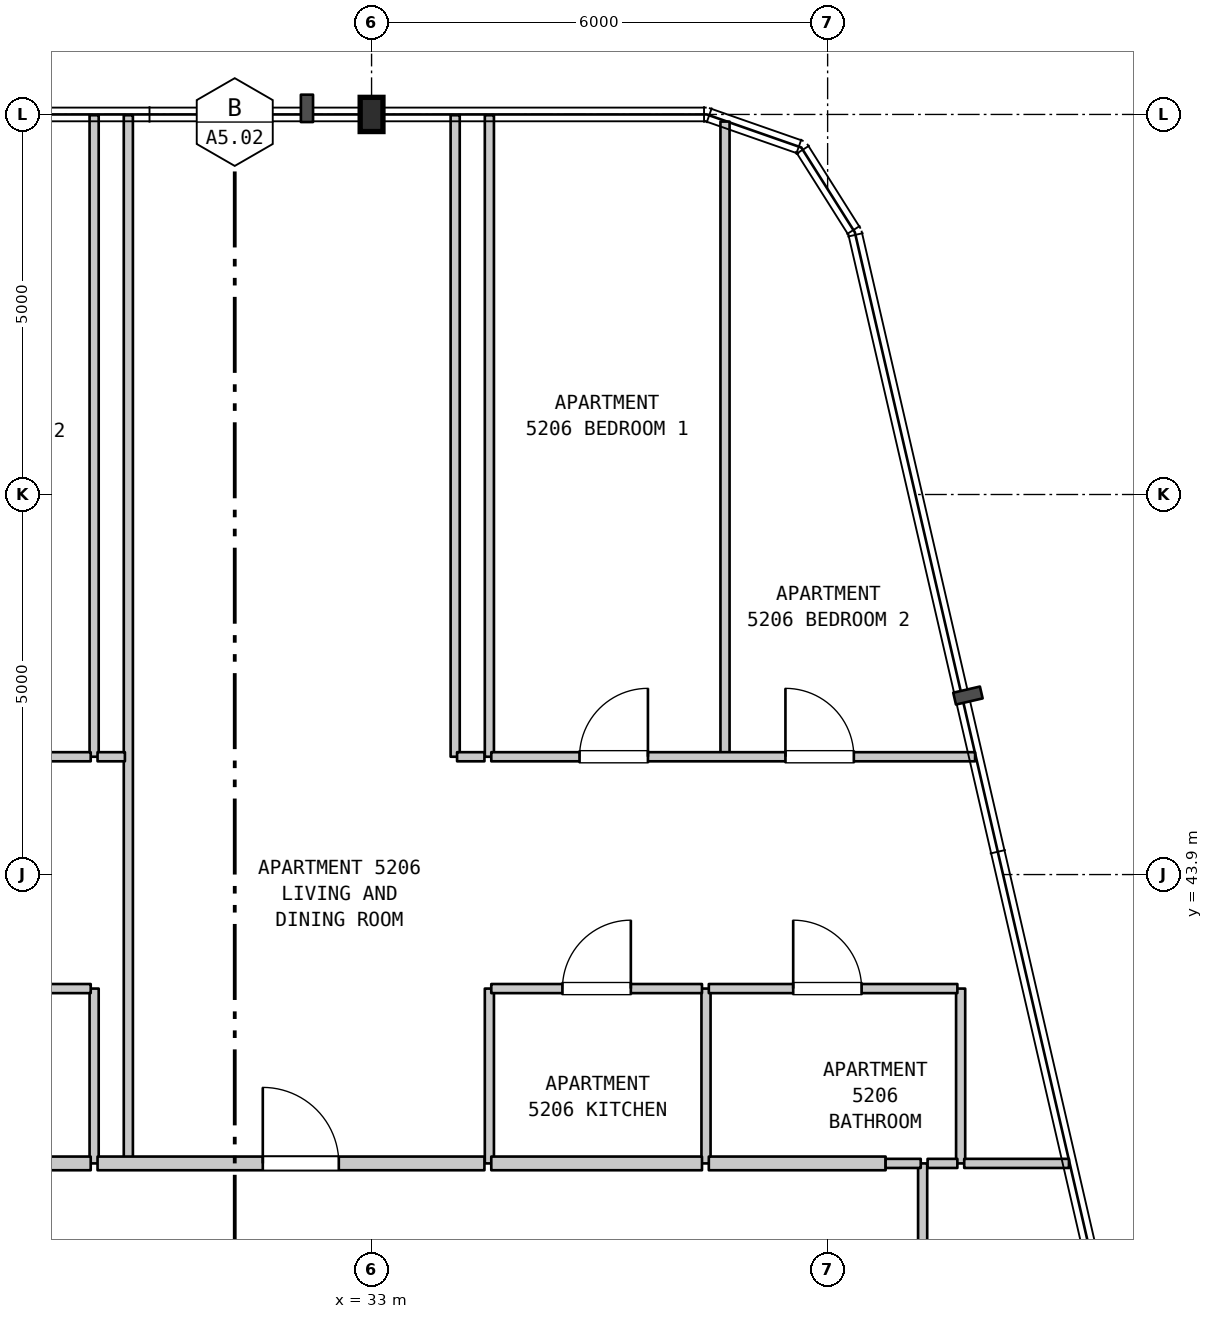
"""IFC4 building model, lengths in metres.
Left out: names, types, materials, properties, quantities, classifications, styles, units other than length and angle.
Written with IfcOpenShell. Run it as: python <this file> out.ifc"""

import sys

from ifc_helpers import new_model, si_unit, direction, frame, frame_2d, origin, origin_2d, place, context, subcontext, project, spatial, rectangle, i_section, extrude, element, fill, save


model = new_model("IFC4")
c1 = context("Model", 3, precision=1e-05, world=origin(), true_north=direction((0.0, 1.0)))
c2 = subcontext(c1, "Body", "Model", "MODEL_VIEW")
j1 = project(units=[si_unit("LENGTHUNIT", "METRE"), si_unit("PLANEANGLEUNIT", "RADIAN")], contexts=[c1])
p1 = place(None, origin())
s1 = spatial("IfcSite", under=j1, at=p1, CompositionType="ELEMENT")
p2 = place(p1, origin())
s2 = spatial("IfcBuilding", under=s1, at=p2, CompositionType="ELEMENT")
p3 = place(p2, frame((0.0, 0.0, 210.6)))
s3 = spatial("IfcBuildingStorey", under=s2, at=p3, CompositionType="ELEMENT", Elevation=210.6)
p4 = place(p3, frame((33.0, 53.9, 0.0), z_axis=(0.0, 0.0, 1.0), x_axis=(1.0, 0.0, 0.0)))
e1 = element("IfcColumn", 1, at=p4, inside=s3, PredefinedType="COLUMN", context=c2, shape_type="SweptSolid", body=[
    extrude(i_section(OverallWidth=0.3, OverallDepth=0.45, WebThickness=0.014, FlangeThickness=0.026, FilletRadius=0.027, at=origin_2d()), origin(), (0.0, 0.0, 1.0), 3.7),
])
p5 = place(p3, frame((29.35, 40.1, 0.0), z_axis=(0.0, 0.0, 1.0), x_axis=(0.0, 1.0, 0.0)))
e2 = element("IfcWall", 2, at=p5, inside=s3, PredefinedType="PARTITIONING", context=c2, shape_type="SweptSolid", body=[
    extrude(rectangle(XDim=2.3, YDim=0.12, at=frame_2d((1.15, 0.0))), origin(), (0.0, 0.0, 1.0), 3.39),
])
p6 = place(p3, frame((29.35, 45.45, 0.0), z_axis=(0.0, 0.0, 1.0), x_axis=(0.0, 1.0, 0.0)))
e3 = element("IfcWall", 3, at=p6, inside=s3, PredefinedType="PARTITIONING", context=c2, shape_type="SweptSolid", body=[
    extrude(rectangle(XDim=8.44, YDim=0.12, at=frame_2d((4.22, 0.0))), origin(), (0.0, 0.0, 1.0), 3.39),
])
p7 = place(p3, frame((29.8, 40.1, 0.0), z_axis=(0.0, 0.0, 1.0), x_axis=(0.0, 1.0, 0.0)))
e4 = element("IfcWall", 4, at=p7, inside=s3, PredefinedType="PARTITIONING", context=c2, shape_type="SweptSolid", body=[
    extrude(rectangle(XDim=13.79, YDim=0.12, at=frame_2d((6.895, 0.0))), origin(), (0.0, 0.0, 1.0), 3.39),
])
p8 = place(p3, frame((34.1, 45.45, 0.0), z_axis=(0.0, 0.0, 1.0), x_axis=(0.0, 1.0, 0.0)))
e5 = element("IfcWall", 5, at=p8, inside=s3, PredefinedType="PARTITIONING", context=c2, shape_type="SweptSolid", body=[
    extrude(rectangle(XDim=8.44, YDim=0.12, at=frame_2d((4.22, 0.0))), origin(), (0.0, 0.0, 1.0), 3.39),
])
p9 = place(p3, frame((34.55, 40.1, 0.0), z_axis=(0.0, 0.0, 1.0), x_axis=(0.0, 1.0, 0.0)))
e6 = element("IfcWall", 6, at=p9, inside=s3, PredefinedType="PARTITIONING", context=c2, shape_type="SweptSolid", body=[
    extrude(rectangle(XDim=2.3, YDim=0.12, at=frame_2d((1.15, 0.0))), origin(), (0.0, 0.0, 1.0), 3.39),
])
p10 = place(p3, frame((34.55, 45.45, 0.0), z_axis=(0.0, 0.0, 1.0), x_axis=(0.0, 1.0, 0.0)))
e7 = element("IfcWall", 7, at=p10, inside=s3, PredefinedType="PARTITIONING", context=c2, shape_type="SweptSolid", body=[
    extrude(rectangle(XDim=8.44, YDim=0.12, at=frame_2d((4.22, 0.0))), origin(), (0.0, 0.0, 1.0), 3.39),
])
p11 = place(p3, frame((37.4, 40.1, 0.0), z_axis=(0.0, 0.0, 1.0), x_axis=(0.0, 1.0, 0.0)))
e8 = element("IfcWall", 8, at=p11, inside=s3, PredefinedType="PARTITIONING", context=c2, shape_type="SweptSolid", body=[
    extrude(rectangle(XDim=2.3, YDim=0.12, at=frame_2d((1.15, 0.0))), origin(), (0.0, 0.0, 1.0), 3.39),
])
p12 = place(p3, frame((37.65, 45.45, 0.0), z_axis=(0.0, 0.0, 1.0), x_axis=(0.0, 1.0, 0.0)))
e9 = element("IfcWall", 9, at=p12, inside=s3, PredefinedType="PARTITIONING", context=c2, shape_type="SweptSolid", body=[
    extrude(rectangle(XDim=8.356, YDim=0.12, at=frame_2d((4.178, 0.0))), origin(), (0.0, 0.0, 1.0), 3.39),
])
p13 = place(p3, frame((40.25, 37.9, 0.0), z_axis=(0.0, 0.0, 1.0), x_axis=(0.0, 1.0, 0.0)))
e10 = element("IfcWall", 10, at=p13, inside=s3, PredefinedType="PARTITIONING", context=c2, shape_type="SweptSolid", body=[
    extrude(rectangle(XDim=2.2, YDim=0.12, at=frame_2d((1.1, 0.0))), origin(), (0.0, 0.0, 1.0), 3.39),
])
p14 = place(p3, frame((40.75, 40.1, 0.0), z_axis=(0.0, 0.0, 1.0), x_axis=(0.0, 1.0, 0.0)))
e11 = element("IfcWall", 11, at=p14, inside=s3, PredefinedType="PARTITIONING", context=c2, shape_type="SweptSolid", body=[
    extrude(rectangle(XDim=2.3, YDim=0.12, at=frame_2d((1.15, 0.0))), origin(), (0.0, 0.0, 1.0), 3.39),
])
p15 = place(p3, frame((26.268, 40.1, 0.0), z_axis=(0.0, 0.0, 1.0), x_axis=(1.0, 0.0, 0.0)))
e12 = element("IfcWall", 12, at=p15, inside=s3, PredefinedType="STANDARD", context=c2, shape_type="SweptSolid", body=[
    extrude(rectangle(XDim=3.037, YDim=0.18, at=frame_2d((1.519, 0.0))), origin(), (0.0, 0.0, 1.0), 3.39),
])
p16 = place(p3, frame((29.395, 40.1, 0.0), z_axis=(0.0, 0.0, 1.0), x_axis=(1.0, 0.0, 0.0)))
e13 = element("IfcWall", 13, at=p16, inside=s3, PredefinedType="STANDARD", context=c2, shape_type="SweptSolid", body=[
    extrude(rectangle(XDim=5.09, YDim=0.18, at=frame_2d((2.545, 0.0))), origin(), (0.0, 0.0, 1.0), 3.39),
])
p17 = place(p16, frame((2.174, 0.0, 0.0)))
e14 = element("IfcOpeningElement", 14, at=p17, cuts=e13, PredefinedType="OPENING", context=c2, shape_type="SweptSolid", body=[
    extrude(rectangle(XDim=1.0, YDim=2.15, at=frame_2d((0.5, 1.075))), frame((0.0, 0.1, 0.0), z_axis=(0.0, -1.0, 0.0), x_axis=(1.0, 0.0, 0.0)), (0.0, 0.0, 1.0), 0.2),
])
p18 = place(p3, frame((34.575, 40.1, 0.0), z_axis=(0.0, 0.0, 1.0), x_axis=(1.0, 0.0, 0.0)))
e15 = element("IfcWall", 15, at=p18, inside=s3, PredefinedType="STANDARD", context=c2, shape_type="SweptSolid", body=[
    extrude(rectangle(XDim=2.772, YDim=0.18, at=frame_2d((1.386, 0.0))), origin(), (0.0, 0.0, 1.0), 3.39),
])
p19 = place(p3, frame((37.437, 40.1, 0.0), z_axis=(0.0, 0.0, 1.0), x_axis=(1.0, 0.0, 0.0)))
e16 = element("IfcWall", 16, at=p19, inside=s3, PredefinedType="STANDARD", context=c2, shape_type="SweptSolid", body=[
    extrude(rectangle(XDim=2.326, YDim=0.18, at=frame_2d((1.163, 0.0))), origin(), (0.0, 0.0, 1.0), 3.39),
])
p20 = place(p3, frame((39.763, 40.1, 0.0), z_axis=(0.0, 0.0, 1.0), x_axis=(1.0, 0.0, 0.0)))
e17 = element("IfcWall", 17, at=p20, inside=s3, PredefinedType="PARTITIONING", context=c2, shape_type="SweptSolid", body=[
    extrude(rectangle(XDim=0.462, YDim=0.12, at=frame_2d((0.231, 0.0))), origin(), (0.0, 0.0, 1.0), 3.39),
])
p21 = place(p3, frame((40.315, 40.1, 0.0), z_axis=(0.0, 0.0, 1.0), x_axis=(1.0, 0.0, 0.0)))
e18 = element("IfcWall", 18, at=p21, inside=s3, PredefinedType="PARTITIONING", context=c2, shape_type="SweptSolid", body=[
    extrude(rectangle(XDim=0.392, YDim=0.12, at=frame_2d((0.196, 0.0))), origin(), (0.0, 0.0, 1.0), 3.39),
])
p22 = place(p3, frame((40.797, 40.1, 0.0), z_axis=(0.0, 0.0, 1.0), x_axis=(1.0, 0.0, 0.0)))
e19 = element("IfcWall", 19, at=p22, inside=s3, PredefinedType="PARTITIONING", context=c2, shape_type="SweptSolid", body=[
    extrude(rectangle(XDim=1.378, YDim=0.12, at=frame_2d((0.689, 0.0))), origin(), (0.0, 0.0, 1.0), 3.39),
])
p23 = place(p3, frame((26.268, 42.4, 0.0), z_axis=(0.0, 0.0, 1.0), x_axis=(1.0, 0.0, 0.0)))
e20 = element("IfcWall", 20, at=p23, inside=s3, PredefinedType="PARTITIONING", context=c2, shape_type="SweptSolid", body=[
    extrude(rectangle(XDim=3.037, YDim=0.12, at=frame_2d((1.519, 0.0))), origin(), (0.0, 0.0, 1.0), 3.39),
])
p24 = place(p23, frame((1.069, 0.0, 0.0)))
e21 = element("IfcOpeningElement", 21, at=p24, cuts=e20, PredefinedType="OPENING", context=c2, shape_type="SweptSolid", body=[
    extrude(rectangle(XDim=0.9, YDim=2.1, at=frame_2d((0.45, 1.05))), frame((0.0, 0.07, 0.0), z_axis=(0.0, -1.0, 0.0), x_axis=(1.0, 0.0, 0.0)), (0.0, 0.0, 1.0), 0.14),
])
p25 = place(p3, frame((34.575, 42.4, 0.0), z_axis=(0.0, 0.0, 1.0), x_axis=(1.0, 0.0, 0.0)))
e22 = element("IfcWall", 22, at=p25, inside=s3, PredefinedType="PARTITIONING", context=c2, shape_type="SweptSolid", body=[
    extrude(rectangle(XDim=2.772, YDim=0.12, at=frame_2d((1.386, 0.0))), origin(), (0.0, 0.0, 1.0), 3.39),
])
p26 = place(p25, frame((0.936, 0.0, 0.0)))
e23 = element("IfcOpeningElement", 23, at=p26, cuts=e22, PredefinedType="OPENING", context=c2, shape_type="SweptSolid", body=[
    extrude(rectangle(XDim=0.9, YDim=2.15, at=frame_2d((0.45, 1.075))), frame((0.0, 0.07, 0.0), z_axis=(0.0, -1.0, 0.0), x_axis=(1.0, 0.0, 0.0)), (0.0, 0.0, 1.0), 0.14),
])
p27 = place(p3, frame((37.437, 42.4, 0.0), z_axis=(0.0, 0.0, 1.0), x_axis=(1.0, 0.0, 0.0)))
e24 = element("IfcWall", 24, at=p27, inside=s3, PredefinedType="PARTITIONING", context=c2, shape_type="SweptSolid", body=[
    extrude(rectangle(XDim=3.27, YDim=0.12, at=frame_2d((1.635, 0.0))), origin(), (0.0, 0.0, 1.0), 3.39),
])
p28 = place(p27, frame((1.11, 0.0, 0.0)))
e25 = element("IfcOpeningElement", 25, at=p28, cuts=e24, PredefinedType="OPENING", context=c2, shape_type="SweptSolid", body=[
    extrude(rectangle(XDim=0.9, YDim=2.1, at=frame_2d((0.45, 1.05))), frame((0.0, 0.07, 0.0), z_axis=(0.0, -1.0, 0.0), x_axis=(1.0, 0.0, 0.0)), (0.0, 0.0, 1.0), 0.14),
])
p29 = place(p3, frame((23.605, 45.45, 0.0), z_axis=(0.0, 0.0, 1.0), x_axis=(1.0, 0.0, 0.0)))
e26 = element("IfcWall", 26, at=p29, inside=s3, PredefinedType="PARTITIONING", context=c2, shape_type="SweptSolid", body=[
    extrude(rectangle(XDim=5.7, YDim=0.12, at=frame_2d((2.85, 0.0))), origin(), (0.0, 0.0, 1.0), 3.39),
])
p30 = place(p29, frame((1.127, 0.0, 0.0)))
e27 = element("IfcOpeningElement", 27, at=p30, cuts=e26, PredefinedType="OPENING", context=c2, shape_type="SweptSolid", body=[
    extrude(rectangle(XDim=0.9, YDim=2.15, at=frame_2d((0.45, 1.075))), frame((0.0, 0.07, 0.0), z_axis=(0.0, -1.0, 0.0), x_axis=(1.0, 0.0, 0.0)), (0.0, 0.0, 1.0), 0.14),
])
p31 = place(p29, frame((3.672, 0.0, 0.0)))
e28 = element("IfcOpeningElement", 28, at=p31, cuts=e26, PredefinedType="OPENING", context=c2, shape_type="SweptSolid", body=[
    extrude(rectangle(XDim=0.9, YDim=2.15, at=frame_2d((0.45, 1.075))), frame((0.0, 0.07, 0.0), z_axis=(0.0, -1.0, 0.0), x_axis=(1.0, 0.0, 0.0)), (0.0, 0.0, 1.0), 0.14),
])
p32 = place(p3, frame((29.395, 45.45, 0.0), z_axis=(0.0, 0.0, 1.0), x_axis=(1.0, 0.0, 0.0)))
e29 = element("IfcWall", 29, at=p32, inside=s3, PredefinedType="PARTITIONING", context=c2, shape_type="SweptSolid", body=[
    extrude(rectangle(XDim=0.36, YDim=0.12, at=frame_2d((0.18, 0.0))), origin(), (0.0, 0.0, 1.0), 3.39),
])
p33 = place(p3, frame((34.125, 45.45, 0.0), z_axis=(0.0, 0.0, 1.0), x_axis=(1.0, 0.0, 0.0)))
e30 = element("IfcWall", 30, at=p33, inside=s3, PredefinedType="PARTITIONING", context=c2, shape_type="SweptSolid", body=[
    extrude(rectangle(XDim=0.36, YDim=0.12, at=frame_2d((0.18, 0.0))), origin(), (0.0, 0.0, 1.0), 3.39),
])
p34 = place(p3, frame((34.575, 45.45, 0.0), z_axis=(0.0, 0.0, 1.0), x_axis=(1.0, 0.0, 0.0)))
e31 = element("IfcWall", 31, at=p34, inside=s3, PredefinedType="PARTITIONING", context=c2, shape_type="SweptSolid", body=[
    extrude(rectangle(XDim=6.365, YDim=0.12, at=frame_2d((3.183, 0.0))), origin(), (0.0, 0.0, 1.0), 3.39),
])
p35 = place(p34, frame((1.161, 0.0, 0.0)))
e32 = element("IfcOpeningElement", 32, at=p35, cuts=e31, PredefinedType="OPENING", context=c2, shape_type="SweptSolid", body=[
    extrude(rectangle(XDim=0.9, YDim=2.15, at=frame_2d((0.45, 1.075))), frame((0.0, 0.07, 0.0), z_axis=(0.0, -1.0, 0.0), x_axis=(1.0, 0.0, 0.0)), (0.0, 0.0, 1.0), 0.14),
])
p36 = place(p34, frame((3.87, 0.0, 0.0)))
e33 = element("IfcOpeningElement", 33, at=p36, cuts=e31, PredefinedType="OPENING", context=c2, shape_type="SweptSolid", body=[
    extrude(rectangle(XDim=0.9, YDim=2.15, at=frame_2d((0.45, 1.075))), frame((0.0, 0.07, 0.0), z_axis=(0.0, -1.0, 0.0), x_axis=(1.0, 0.0, 0.0)), (0.0, 0.0, 1.0), 0.14),
])
p37 = place(p17, origin())
e34 = element("IfcDoor", 34, at=p37, inside=s3, OperationType="SINGLE_SWING_LEFT", PredefinedType="DOOR", context=c2, shape_type="SweptSolid", body=[
    extrude(rectangle(XDim=1.0, YDim=2.15, at=frame_2d((0.5, 1.075))), frame((0.0, 0.025, 0.0), z_axis=(0.0, -1.0, 0.0), x_axis=(1.0, 0.0, 0.0)), (0.0, 0.0, 1.0), 0.05),
])
fill(e14, e34)
p38 = place(p26, origin())
e35 = element("IfcDoor", 35, at=p38, inside=s3, OperationType="SINGLE_SWING_RIGHT", PredefinedType="DOOR", context=c2, shape_type="SweptSolid", body=[
    extrude(rectangle(XDim=0.9, YDim=2.15, at=frame_2d((0.45, 1.075))), frame((0.0, 0.025, 0.0), z_axis=(0.0, -1.0, 0.0), x_axis=(1.0, 0.0, 0.0)), (0.0, 0.0, 1.0), 0.05),
])
fill(e23, e35)
p39 = place(p28, origin())
e36 = element("IfcDoor", 36, at=p39, inside=s3, OperationType="SINGLE_SWING_LEFT", PredefinedType="DOOR", context=c2, shape_type="SweptSolid", body=[
    extrude(rectangle(XDim=0.9, YDim=2.1, at=frame_2d((0.45, 1.05))), frame((0.0, 0.025, 0.0), z_axis=(0.0, -1.0, 0.0), x_axis=(1.0, 0.0, 0.0)), (0.0, 0.0, 1.0), 0.05),
])
fill(e25, e36)
p40 = place(p35, origin())
e37 = element("IfcDoor", 37, at=p40, inside=s3, OperationType="SINGLE_SWING_RIGHT", PredefinedType="DOOR", context=c2, shape_type="SweptSolid", body=[
    extrude(rectangle(XDim=0.9, YDim=2.15, at=frame_2d((0.45, 1.075))), frame((0.0, 0.025, 0.0), z_axis=(0.0, -1.0, 0.0), x_axis=(1.0, 0.0, 0.0)), (0.0, 0.0, 1.0), 0.05),
])
fill(e32, e37)
p41 = place(p36, origin())
e38 = element("IfcDoor", 38, at=p41, inside=s3, OperationType="SINGLE_SWING_LEFT", PredefinedType="DOOR", context=c2, shape_type="SweptSolid", body=[
    extrude(rectangle(XDim=0.9, YDim=2.15, at=frame_2d((0.45, 1.075))), frame((0.0, 0.025, 0.0), z_axis=(0.0, -1.0, 0.0), x_axis=(1.0, 0.0, 0.0)), (0.0, 0.0, 1.0), 0.05),
])
fill(e33, e38)
save(model, sys.argv[1])
